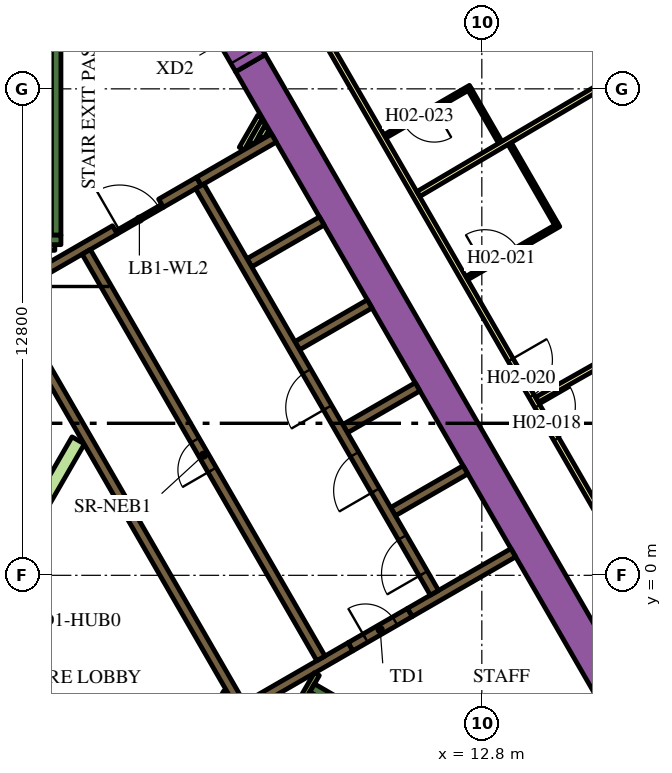
"""IFC4 building model, lengths in metres.
Left out: names, types, materials, properties, quantities, classifications, styles, units other than length and angle.
Written with IfcOpenShell. Run it as: python <this file> out.ifc"""

import sys

from ifc_helpers import new_model, si_unit, direction, frame, frame_2d, origin, place, context, subcontext, project, spatial, polyline, rectangle, outline, extrude, element, fill, save


model = new_model("IFC4")
c1 = context("Model", 3, precision=1e-05, world=origin(), true_north=direction((0.0, 1.0)))
c2 = subcontext(c1, "Body", "Model", "MODEL_VIEW")
j1 = project(units=[si_unit("LENGTHUNIT", "METRE"), si_unit("PLANEANGLEUNIT", "RADIAN")], contexts=[c1])
p1 = place(None, origin())
s1 = spatial("IfcSite", under=j1, at=p1, CompositionType="ELEMENT")
p2 = place(p1, origin())
s2 = spatial("IfcBuilding", under=s1, at=p2, CompositionType="ELEMENT")
p3 = place(p2, frame((0.0, 0.0, 39.3)))
s3 = spatial("IfcBuildingStorey", under=s2, at=p3, CompositionType="ELEMENT", Elevation=39.3)
p4 = place(p3, frame((6.711, 13.476, 0.0), z_axis=(0.0, 0.0, 1.0), x_axis=(0.500002723396, -0.866023831425, 0.0)))
e1 = element("IfcWall", 1, at=p4, inside=s3, PredefinedType="SOLIDWALL", context=c2, shape_type="SweptSolid", body=[
    extrude(rectangle(XDim=20.334, YDim=0.9, at=frame_2d((10.167, 0.0))), origin(), (0.0, 0.0, 1.0), 3.9),
])
p5 = place(p3, frame((8.334, -2.964, 0.0), z_axis=(0.0, 0.0, 1.0), x_axis=(0.866016039709, -0.500016218704, 0.0)))
e2 = element("IfcWall", 2, at=p5, inside=s3, PredefinedType="SOLIDWALL", context=c2, shape_type="SweptSolid", body=[
    extrude(rectangle(XDim=7.05, YDim=0.25, at=frame_2d((3.525, 0.0))), origin(), (0.0, 0.0, 1.0), 3.9),
])
p6 = place(p3, frame((8.168, -3.503, 0.0), z_axis=(0.0, 0.0, 1.0), x_axis=(0.49972245349, 0.866185586049, 0.0)))
e3 = element("IfcWall", 3, at=p6, inside=s3, PredefinedType="SOLIDWALL", context=c2, shape_type="SweptSolid", body=[
    extrude(rectangle(XDim=0.425, YDim=0.25, at=frame_2d((0.212, 0.0))), origin(), (0.0, 0.0, 1.0), 3.9),
])
p7 = place(p3, frame((1.6, 8.95, 0.0), z_axis=(0.0, 0.0, 1.0), x_axis=(0.0, 1.0, 0.0)))
e4 = element("IfcWall", 4, at=p7, inside=s3, PredefinedType="SOLIDWALL", context=c2, shape_type="SweptSolid", body=[
    extrude(rectangle(XDim=6.8, YDim=0.25, at=frame_2d((3.4, 0.0))), origin(), (0.0, 0.0, 1.0), 3.9),
])
p8 = place(p3, frame((1.05, 8.825, 0.0), z_axis=(0.0, 0.0, 1.0), x_axis=(1.0, 0.0, 0.0)))
e5 = element("IfcWall", 5, at=p8, inside=s3, PredefinedType="SOLIDWALL", context=c2, shape_type="SweptSolid", body=[
    extrude(rectangle(XDim=0.675, YDim=0.25, at=frame_2d((0.337, 0.0))), origin(), (0.0, 0.0, 1.0), 3.9),
])
p9 = place(p3, frame((10.464, 1.677, 0.0), z_axis=(0.0, 0.0, 1.0), x_axis=(0.86605622881, 0.499946605688, 0.0)))
e6 = element("IfcWall", 6, at=p9, inside=s3, PredefinedType="SOLIDWALL", context=c2, shape_type="SweptSolid", body=[
    extrude(rectangle(XDim=2.2, YDim=0.25, at=frame_2d((1.1, 0.0))), origin(), (0.0, 0.0, 1.0), 3.9),
])
p10 = place(p3, frame((13.629, 0.594, 0.0), z_axis=(0.0, 0.0, 1.0), x_axis=(-0.86602790099, -0.499995674689, 0.0)))
e7 = element("IfcWall", 7, at=p10, inside=s3, PredefinedType="SOLIDWALL", context=c2, shape_type="SweptSolid", body=[
    extrude(rectangle(XDim=3.146, YDim=0.25, at=frame_2d((1.573, 0.0))), origin(), (0.0, 0.0, 1.0), 3.9),
])
p11 = place(p3, origin())
e8 = element("IfcWall", 8, at=p11, inside=s3, PredefinedType="SOLIDWALL", context=c2, shape_type="SweptSolid", body=[
    extrude(outline(polyline([(0.566, 6.725), (0.566, 6.875), (0.566, 6.875), (0.565, 6.875), (0.361, 6.875), (0.035, 7.439), (0.252, 7.564), (0.377, 7.348), (6.552, -3.348), (6.677, -3.564), (6.46, -3.689), (0.448, 6.725), (0.565, 6.725), (0.566, 6.725), (0.566, 6.725)])), origin(), (0.0, 0.0, 1.0), 3.9),
])
p12 = place(p3, frame((4.358, 9.791, 0.0), z_axis=(0.0, 0.0, 1.0), x_axis=(0.866079547155, 0.499906209203, 0.0)))
e9 = element("IfcWall", 9, at=p12, inside=s3, PredefinedType="SOLIDWALL", context=c2, shape_type="SweptSolid", body=[
    extrude(rectangle(XDim=1.15, YDim=0.25, at=frame_2d((0.575, 0.0))), origin(), (0.0, 0.0, 1.0), 3.9),
])
p13 = place(p3, frame((5.356, 10.367, 0.0), z_axis=(0.0, 0.0, 1.0), x_axis=(0.865978535641, 0.50008116922, 0.0)))
e10 = element("IfcWall", 10, at=p13, inside=s3, PredefinedType="SOLIDWALL", context=c2, shape_type="SweptSolid", body=[
    extrude(rectangle(XDim=2.278, YDim=0.25, at=frame_2d((1.139, 0.0))), origin(), (0.0, 0.0, 1.0), 3.9),
])
p14 = place(p3, frame((0.314, 7.456, 0.0), z_axis=(0.0, 0.0, 1.0), x_axis=(0.866013897511, 0.50001992892, 0.0)))
e11 = element("IfcWall", 11, at=p14, inside=s3, PredefinedType="SOLIDWALL", context=c2, shape_type="SweptSolid", body=[
    extrude(rectangle(XDim=3.268, YDim=0.25, at=frame_2d((1.634, 0.0))), origin(), (0.0, 0.0, 1.0), 3.9),
])
p15 = place(p3, frame((6.614, -3.456, 0.0), z_axis=(0.0, 0.0, 1.0), x_axis=(0.86602447079, 0.500001615989, 0.0)))
e12 = element("IfcWall", 12, at=p15, inside=s3, PredefinedType="SOLIDWALL", context=c2, shape_type="SweptSolid", body=[
    extrude(rectangle(XDim=3.154, YDim=0.25, at=frame_2d((1.577, 0.0))), origin(), (0.0, 0.0, 1.0), 3.9),
])
for number, where, z_axis, x_axis in (
    (13, (6.684, 8.224, 0.0), (0.0, 0.0, 1.0), (0.866, 0.5, 0.0)),
    (14, (7.944, 6.041, 0.0), (0.0, 0.0, 1.0), (0.866, 0.5, 0.0)),
    (15, (9.204, 3.859, 0.0), (0.0, 0.0, 1.0), (0.866, 0.5, 0.0)),
):
    element("IfcWall", number, at=place(p3, frame(where, z_axis=z_axis, x_axis=x_axis)), inside=s3, PredefinedType="SOLIDWALL", context=c2, shape_type="SweptSolid", body=[
        extrude(rectangle(XDim=2.2, YDim=0.25, at=frame_2d((1.1, 0.0))), origin(), (0.0, 0.0, 1.0), 3.9),
    ])
p16 = place(p3, frame((5.705, -3.718, 0.0), z_axis=(0.0, 0.0, 1.0), x_axis=(0.499962090823, 0.866047289552, 0.0)))
e16 = element("IfcWall", 16, at=p16, inside=s3, PredefinedType="PARTITIONING", context=c2, shape_type="SweptSolid", body=[
    extrude(rectangle(XDim=0.735, YDim=0.15, at=frame_2d((0.367, 0.0))), origin(), (0.0, 0.0, 1.0), 2.75),
])
p17 = place(p3, frame((8.459, -2.599, 0.0), z_axis=(0.0, 0.0, 1.0), x_axis=(-0.500041054325, -0.866001699761, 0.0)))
e17 = element("IfcWall", 17, at=p17, inside=s3, PredefinedType="PARTITIONING", context=c2, shape_type="SweptSolid", body=[
    extrude(rectangle(XDim=0.929, YDim=0.15, at=frame_2d((0.464, 0.0))), origin(), (0.0, 0.0, 1.0), 3.9),
])
e18 = element("IfcWall", 18, at=p11, inside=s3, PredefinedType="PARTITIONING", context=c2, shape_type="SweptSolid", body=[
    extrude(outline(polyline([(2.017, 3.643), (2.342, 3.456), (0.785, 0.76), (0.46, 0.947), (2.017, 3.643)])), origin(), (0.0, 0.0, 1.0), 2.75),
])
p18 = place(p3, frame((1.05, 8.625, 0.0), z_axis=(0.0, 0.0, 1.0), x_axis=(1.0, 0.0, 0.0)))
e19 = element("IfcWall", 19, at=p18, inside=s3, PredefinedType="PARTITIONING", context=c2, shape_type="SweptSolid", body=[
    extrude(rectangle(XDim=0.514, YDim=0.15, at=frame_2d((0.257, 0.0))), origin(), (0.0, 0.0, 1.0), 2.75),
])
p19 = place(p3, frame((6.482, 11.225, 0.0), z_axis=(0.0, 0.0, 1.0), x_axis=(0.5001061818, 0.865964091014, 0.0)))
e20 = element("IfcWall", 20, at=p19, inside=s3, PredefinedType="PARTITIONING", context=c2, shape_type="SweptSolid", body=[
    extrude(rectangle(XDim=0.973, YDim=0.15, at=frame_2d((0.486, 0.0))), origin(), (0.0, 0.0, 1.0), 2.75),
])
p20 = place(p3, frame((6.742, 11.375, 0.0), z_axis=(0.0, 0.0, 1.0), x_axis=(0.499744951064, 0.86617260629, 0.0)))
e21 = element("IfcWall", 21, at=p20, inside=s3, PredefinedType="PARTITIONING", context=c2, shape_type="SweptSolid", body=[
    extrude(rectangle(XDim=0.626, YDim=0.15, at=frame_2d((0.313, 0.0))), origin(), (0.0, 0.0, 1.0), 2.75),
])
p21 = place(p3, frame((7.001, 11.525, 0.0), z_axis=(0.0, 0.0, 1.0), x_axis=(0.499797962495, 0.866142018774, 0.0)))
e22 = element("IfcWall", 22, at=p21, inside=s3, PredefinedType="PARTITIONING", context=c2, shape_type="SweptSolid", body=[
    extrude(rectangle(XDim=0.28, YDim=0.15, at=frame_2d((0.14, 0.0))), origin(), (0.0, 0.0, 1.0), 2.75),
])
p22 = place(p3, frame((11.553, -0.46, 0.0), z_axis=(0.0, 0.0, 1.0), x_axis=(-0.500006514828, 0.866021642414, 0.0)))
e23 = element("IfcWall", 23, at=p22, inside=s3, PredefinedType="SOLIDWALL", context=c2, shape_type="SweptSolid", body=[
    extrude(rectangle(XDim=12.35, YDim=0.25, at=frame_2d((6.175, 0.0))), origin(), (0.0, 0.0, 1.0), 3.9),
])
p23 = place(p22, frame((0.585, 0.0, 0.0)))
e24 = element("IfcOpeningElement", 24, at=p23, cuts=e23, PredefinedType="OPENING", context=c2, shape_type="SweptSolid", body=[
    extrude(rectangle(XDim=1.1, YDim=2.1, at=frame_2d((0.55, 1.05))), frame((0.0, 0.135, 0.0), z_axis=(0.0, -1.0, 0.0), x_axis=(1.0, 0.0, 0.0)), (0.0, 0.0, 1.0), 0.27),
])
p24 = place(p22, frame((3.105, 0.0, 0.0)))
e25 = element("IfcOpeningElement", 25, at=p24, cuts=e23, PredefinedType="OPENING", context=c2, shape_type="SweptSolid", body=[
    extrude(rectangle(XDim=1.1, YDim=2.1, at=frame_2d((0.55, 1.05))), frame((0.0, 0.135, 0.0), z_axis=(0.0, -1.0, 0.0), x_axis=(1.0, 0.0, 0.0)), (0.0, 0.0, 1.0), 0.27),
])
p25 = place(p22, frame((5.625, 0.0, 0.0)))
e26 = element("IfcOpeningElement", 26, at=p25, cuts=e23, PredefinedType="OPENING", context=c2, shape_type="SweptSolid", body=[
    extrude(rectangle(XDim=1.1, YDim=2.1, at=frame_2d((0.55, 1.05))), frame((0.0, 0.135, 0.0), z_axis=(0.0, -1.0, 0.0), x_axis=(1.0, 0.0, 0.0)), (0.0, 0.0, 1.0), 0.27),
])
p26 = place(p3, frame((8.565, -2.185, 0.0), z_axis=(0.0, 0.0, 1.0), x_axis=(-0.499997954832, 0.866026584559, 0.0)))
e27 = element("IfcWall", 27, at=p26, inside=s3, PredefinedType="SOLIDWALL", context=c2, shape_type="SweptSolid", body=[
    extrude(rectangle(XDim=12.35, YDim=0.25, at=frame_2d((6.175, 0.0))), origin(), (0.0, 0.0, 1.0), 3.9),
])
p27 = place(p26, frame((5.725, 0.0, 0.0)))
e28 = element("IfcOpeningElement", 28, at=p27, cuts=e27, PredefinedType="OPENING", context=c2, shape_type="SweptSolid", body=[
    extrude(rectangle(XDim=0.9, YDim=2.1, at=frame_2d((0.45, 1.05))), frame((0.0, 0.135, 0.0), z_axis=(0.0, -1.0, 0.0), x_axis=(1.0, 0.0, 0.0)), (0.0, 0.0, 1.0), 0.27),
])
p28 = place(p3, frame((9.346, -1.879, 0.0), z_axis=(0.0, 0.0, 1.0), x_axis=(0.866047807691, 0.499961193289, 0.0)))
e29 = element("IfcWall", 29, at=p28, inside=s3, PredefinedType="SOLIDWALL", context=c2, shape_type="SweptSolid", body=[
    extrude(rectangle(XDim=1.8, YDim=0.25, at=frame_2d((0.9, 0.0))), origin(), (0.0, 0.0, 1.0), 3.9),
])
p29 = place(p28, frame((0.45, 0.0, 0.0)))
e30 = element("IfcOpeningElement", 30, at=p29, cuts=e29, PredefinedType="OPENING", context=c2, shape_type="SweptSolid", body=[
    extrude(rectangle(XDim=0.9, YDim=2.1, at=frame_2d((0.45, 1.05))), frame((0.0, 0.135, 0.0), z_axis=(0.0, -1.0, 0.0), x_axis=(1.0, 0.0, 0.0)), (0.0, 0.0, 1.0), 0.27),
])
p30 = place(p3, frame((3.183, 9.02, 0.0), z_axis=(0.0, 0.0, 1.0), x_axis=(0.866034573852, 0.49998411664, 0.0)))
e31 = element("IfcWall", 31, at=p30, inside=s3, PredefinedType="PARTITIONING", context=c2, shape_type="SweptSolid", body=[
    extrude(rectangle(XDim=1.4, YDim=0.09, at=frame_2d((0.7, 0.0))), origin(), (0.0, 0.0, 1.0), 2.75),
])
p31 = place(p30, frame((0.1, 0.0, 0.0)))
e32 = element("IfcOpeningElement", 32, at=p31, cuts=e31, PredefinedType="OPENING", context=c2, shape_type="SweptSolid", body=[
    extrude(rectangle(XDim=1.2, YDim=2.1, at=frame_2d((0.6, 1.05))), frame((0.0, 0.055, 0.0), z_axis=(0.0, -1.0, 0.0), x_axis=(1.0, 0.0, 0.0)), (0.0, 0.0, 1.0), 0.11),
])
p32 = place(p3, frame((5.861, 14.948, 0.0), z_axis=(0.0, 0.0, 1.0), x_axis=(0.500062241894, -0.865989465428, 0.0)))
e33 = element("IfcWall", 33, at=p32, inside=s3, PredefinedType="SOLIDWALL", context=c2, shape_type="SweptSolid", body=[
    extrude(rectangle(XDim=1.7, YDim=0.9, at=frame_2d((0.85, 0.0))), origin(), (0.0, 0.0, 1.0), 3.9),
])
p33 = place(p32, frame((0.25, 0.0, 0.0)))
e34 = element("IfcOpeningElement", 34, at=p33, cuts=e33, PredefinedType="OPENING", context=c2, shape_type="SweptSolid", body=[
    extrude(rectangle(XDim=1.2, YDim=2.1, at=frame_2d((0.6, 1.05))), frame((0.0, 0.46, 0.0), z_axis=(0.0, -1.0, 0.0), x_axis=(1.0, 0.0, 0.0)), (0.0, 0.0, 1.0), 0.92),
])
p34 = place(p3, frame((6.163, 18.475, 0.0), z_axis=(0.0, 0.0, 1.0), x_axis=(0.500001317485, -0.866024643133, 0.0)))
e35 = element("IfcWall", 35, at=p34, inside=s3, PredefinedType="PARTITIONING", context=c2, shape_type="SweptSolid", body=[
    extrude(rectangle(XDim=25.767, YDim=0.15, at=frame_2d((12.883, 0.0))), origin(), (0.0, 0.0, 1.0), 2.75),
])
p35 = place(p34, frame((24.586, 0.0, 0.0)))
e36 = element("IfcOpeningElement", 36, at=p35, cuts=e35, PredefinedType="OPENING", context=c2, shape_type="SweptSolid", body=[
    extrude(rectangle(XDim=1.0, YDim=2.1, at=frame_2d((0.5, 1.05))), frame((0.0, 0.085, 0.0), z_axis=(0.0, -1.0, 0.0), x_axis=(1.0, 0.0, 0.0)), (0.0, 0.0, 1.0), 0.17),
])
p36 = place(p34, frame((16.196, 0.0, 0.0)))
e37 = element("IfcOpeningElement", 37, at=p36, cuts=e35, PredefinedType="OPENING", context=c2, shape_type="SweptSolid", body=[
    extrude(rectangle(XDim=1.0, YDim=2.1, at=frame_2d((0.5, 1.05))), frame((0.0, 0.085, 0.0), z_axis=(0.0, -1.0, 0.0), x_axis=(1.0, 0.0, 0.0)), (0.0, 0.0, 1.0), 0.17),
])
p37 = place(p34, frame((14.789, 0.0, 0.0)))
e38 = element("IfcOpeningElement", 38, at=p37, cuts=e35, PredefinedType="OPENING", context=c2, shape_type="SweptSolid", body=[
    extrude(rectangle(XDim=1.1, YDim=2.1, at=frame_2d((0.55, 1.05))), frame((0.0, 0.085, 0.0), z_axis=(0.0, -1.0, 0.0), x_axis=(1.0, 0.0, 0.0)), (0.0, 0.0, 1.0), 0.17),
])
p38 = place(p34, frame((3.698, 0.0, 0.0)))
e39 = element("IfcOpeningElement", 39, at=p38, cuts=e35, PredefinedType="OPENING", context=c2, shape_type="SweptSolid", body=[
    extrude(rectangle(XDim=1.0, YDim=2.1, at=frame_2d((0.5, 1.05))), frame((0.0, 0.085, 0.0), z_axis=(0.0, -1.0, 0.0), x_axis=(1.0, 0.0, 0.0)), (0.0, 0.0, 1.0), 0.17),
])
p39 = place(p34, frame((2.391, 0.0, 0.0)))
e40 = element("IfcOpeningElement", 40, at=p39, cuts=e35, PredefinedType="OPENING", context=c2, shape_type="SweptSolid", body=[
    extrude(rectangle(XDim=1.0, YDim=2.1, at=frame_2d((0.5, 1.05))), frame((0.0, 0.085, 0.0), z_axis=(0.0, -1.0, 0.0), x_axis=(1.0, 0.0, 0.0)), (0.0, 0.0, 1.0), 0.17),
])
p40 = place(p3, frame((17.856, 13.999, 0.0), z_axis=(0.0, 0.0, 1.0), x_axis=(-0.861371519381, -0.507975497047, 0.0)))
e41 = element("IfcWall", 41, at=p40, inside=s3, PredefinedType="PARTITIONING", context=c2, shape_type="SweptSolid", body=[
    extrude(rectangle(XDim=7.804, YDim=0.15, at=frame_2d((3.902, 0.0))), origin(), (0.0, 0.0, 1.0), 2.75),
])
p41 = place(p3, frame((21.052, 8.464, 0.0), z_axis=(0.0, 0.0, 1.0), x_axis=(-0.87059371954, -0.492002617368, 0.0)))
e42 = element("IfcWall", 42, at=p41, inside=s3, PredefinedType="PARTITIONING", context=c2, shape_type="SweptSolid", body=[
    extrude(rectangle(XDim=7.803, YDim=0.15, at=frame_2d((3.902, 0.0))), origin(), (0.0, 0.0, 1.0), 2.75),
])
p42 = place(p3, frame((12.402, 7.819, 0.0), z_axis=(0.0, 0.0, 1.0), x_axis=(0.866034573852, 0.49998411664, 0.0)))
e43 = element("IfcWall", 43, at=p42, inside=s3, PredefinedType="PARTITIONING", context=c2, shape_type="SweptSolid", body=[
    extrude(rectangle(XDim=2.8, YDim=0.1, at=frame_2d((1.4, 0.0))), origin(), (0.0, 0.0, 1.0), 2.75),
])
p43 = place(p42, frame((0.55, 0.0, 0.0)))
e44 = element("IfcOpeningElement", 44, at=p43, cuts=e43, PredefinedType="OPENING", context=c2, shape_type="SweptSolid", body=[
    extrude(rectangle(XDim=1.0, YDim=2.1, at=frame_2d((0.5, 1.05))), frame((0.0, 0.06, 0.0), z_axis=(0.0, -1.0, 0.0), x_axis=(1.0, 0.0, 0.0)), (0.0, 0.0, 1.0), 0.12),
])
p44 = place(p3, frame((14.759, 9.237, 0.0), z_axis=(0.0, 0.0, 1.0), x_axis=(-0.499943856944, 0.866057815567, 0.0)))
e45 = element("IfcWall", 45, at=p44, inside=s3, PredefinedType="PARTITIONING", context=c2, shape_type="SweptSolid", body=[
    extrude(rectangle(XDim=2.45, YDim=0.1, at=frame_2d((1.225, 0.0))), origin(), (0.0, 0.0, 1.0), 2.75),
])
p45 = place(p3, frame((12.5, 12.849, 0.0), z_axis=(0.0, 0.0, 1.0), x_axis=(-0.866021400173, -0.500006934395, 0.0)))
e46 = element("IfcWall", 46, at=p45, inside=s3, PredefinedType="PARTITIONING", context=c2, shape_type="SweptSolid", body=[
    extrude(rectangle(XDim=2.6, YDim=0.1, at=frame_2d((1.3, 0.0))), origin(), (0.0, 0.0, 1.0), 2.75),
])
p46 = place(p45, frame((1.1, 0.0, 0.0)))
e47 = element("IfcOpeningElement", 47, at=p46, cuts=e46, PredefinedType="OPENING", context=c2, shape_type="SweptSolid", body=[
    extrude(rectangle(XDim=0.9, YDim=2.1, at=frame_2d((0.45, 1.05))), frame((0.0, 0.06, 0.0), z_axis=(0.0, -1.0, 0.0), x_axis=(1.0, 0.0, 0.0)), (0.0, 0.0, 1.0), 0.12),
])
p47 = place(p3, frame((12.482, 12.781, 0.0), z_axis=(0.0, 0.0, 1.0), x_axis=(0.500061482766, -0.865989903783, 0.0)))
e48 = element("IfcWall", 48, at=p47, inside=s3, PredefinedType="PARTITIONING", context=c2, shape_type="SweptSolid", body=[
    extrude(rectangle(XDim=1.6, YDim=0.1, at=frame_2d((0.8, 0.0))), origin(), (0.0, 0.0, 1.0), 2.75),
])
p48 = place(p23, origin())
e49 = element("IfcDoor", 49, at=p48, inside=s3, OperationType="DOUBLE_DOOR_SLIDING", PredefinedType="DOOR", context=c2, shape_type="SweptSolid", body=[
    extrude(rectangle(XDim=1.1, YDim=2.1, at=frame_2d((0.55, 1.05))), frame((0.0, 0.025, 0.0), z_axis=(0.0, -1.0, 0.0), x_axis=(1.0, 0.0, 0.0)), (0.0, 0.0, 1.0), 0.05),
])
fill(e24, e49)
p49 = place(p24, origin())
e50 = element("IfcDoor", 50, at=p49, inside=s3, OperationType="DOUBLE_DOOR_SLIDING", PredefinedType="DOOR", context=c2, shape_type="SweptSolid", body=[
    extrude(rectangle(XDim=1.1, YDim=2.1, at=frame_2d((0.55, 1.05))), frame((0.0, 0.025, 0.0), z_axis=(0.0, -1.0, 0.0), x_axis=(1.0, 0.0, 0.0)), (0.0, 0.0, 1.0), 0.05),
])
fill(e25, e50)
p50 = place(p25, origin())
e51 = element("IfcDoor", 51, at=p50, inside=s3, OperationType="DOUBLE_DOOR_SLIDING", PredefinedType="DOOR", context=c2, shape_type="SweptSolid", body=[
    extrude(rectangle(XDim=1.1, YDim=2.1, at=frame_2d((0.55, 1.05))), frame((0.0, 0.025, 0.0), z_axis=(0.0, -1.0, 0.0), x_axis=(1.0, 0.0, 0.0)), (0.0, 0.0, 1.0), 0.05),
])
fill(e26, e51)
p51 = place(p27, origin())
e52 = element("IfcDoor", 52, at=p51, inside=s3, OperationType="SINGLE_SWING_LEFT", PredefinedType="DOOR", context=c2, shape_type="SweptSolid", body=[
    extrude(rectangle(XDim=0.9, YDim=2.1, at=frame_2d((0.45, 1.05))), frame((0.0, 0.025, 0.0), z_axis=(0.0, -1.0, 0.0), x_axis=(1.0, 0.0, 0.0)), (0.0, 0.0, 1.0), 0.05),
])
fill(e28, e52)
p52 = place(p29, origin())
e53 = element("IfcDoor", 53, at=p52, inside=s3, OperationType="SINGLE_SWING_LEFT", PredefinedType="DOOR", context=c2, shape_type="SweptSolid", body=[
    extrude(rectangle(XDim=0.9, YDim=2.1, at=frame_2d((0.45, 1.05))), frame((0.0, 0.025, 0.0), z_axis=(0.0, -1.0, 0.0), x_axis=(1.0, 0.0, 0.0)), (0.0, 0.0, 1.0), 0.05),
])
fill(e30, e53)
p53 = place(p31, origin())
e54 = element("IfcDoor", 54, at=p53, inside=s3, OperationType="SINGLE_SWING_LEFT", PredefinedType="DOOR", context=c2, shape_type="SweptSolid", body=[
    extrude(rectangle(XDim=1.2, YDim=2.1, at=frame_2d((0.6, 1.05))), frame((0.0, 0.025, 0.0), z_axis=(0.0, -1.0, 0.0), x_axis=(1.0, 0.0, 0.0)), (0.0, 0.0, 1.0), 0.05),
])
fill(e32, e54)
p54 = place(p33, origin())
e55 = element("IfcDoor", 55, at=p54, inside=s3, OperationType="SINGLE_SWING_LEFT", PredefinedType="DOOR", context=c2, shape_type="SweptSolid", body=[
    extrude(rectangle(XDim=1.2, YDim=2.1, at=frame_2d((0.6, 1.05))), frame((0.0, 0.025, 0.0), z_axis=(0.0, -1.0, 0.0), x_axis=(1.0, 0.0, 0.0)), (0.0, 0.0, 1.0), 0.05),
])
fill(e34, e55)
p55 = place(p36, origin())
e56 = element("IfcDoor", 56, at=p55, inside=s3, OperationType="SINGLE_SWING_LEFT", PredefinedType="DOOR", context=c2, shape_type="SweptSolid", body=[
    extrude(rectangle(XDim=1.0, YDim=2.1, at=frame_2d((0.5, 1.05))), frame((0.0, 0.025, 0.0), z_axis=(0.0, -1.0, 0.0), x_axis=(1.0, 0.0, 0.0)), (0.0, 0.0, 1.0), 0.05),
])
fill(e37, e56)
p56 = place(p37, origin())
e57 = element("IfcDoor", 57, at=p56, inside=s3, OperationType="SINGLE_SWING_RIGHT", PredefinedType="DOOR", context=c2, shape_type="SweptSolid", body=[
    extrude(rectangle(XDim=1.1, YDim=2.1, at=frame_2d((0.55, 1.05))), frame((0.0, 0.025, 0.0), z_axis=(0.0, -1.0, 0.0), x_axis=(1.0, 0.0, 0.0)), (0.0, 0.0, 1.0), 0.05),
])
fill(e38, e57)
p57 = place(p43, origin())
e58 = element("IfcDoor", 58, at=p57, inside=s3, OperationType="SINGLE_SWING_LEFT", PredefinedType="DOOR", context=c2, shape_type="SweptSolid", body=[
    extrude(rectangle(XDim=1.0, YDim=2.1, at=frame_2d((0.5, 1.05))), frame((0.0, 0.025, 0.0), z_axis=(0.0, -1.0, 0.0), x_axis=(1.0, 0.0, 0.0)), (0.0, 0.0, 1.0), 0.05),
])
fill(e44, e58)
p58 = place(p46, origin())
e59 = element("IfcDoor", 59, at=p58, inside=s3, OperationType="SINGLE_SWING_RIGHT", PredefinedType="DOOR", context=c2, shape_type="SweptSolid", body=[
    extrude(rectangle(XDim=0.9, YDim=2.1, at=frame_2d((0.45, 1.05))), frame((0.0, 0.025, 0.0), z_axis=(0.0, -1.0, 0.0), x_axis=(1.0, 0.0, 0.0)), (0.0, 0.0, 1.0), 0.05),
])
fill(e47, e59)
save(model, sys.argv[1])
